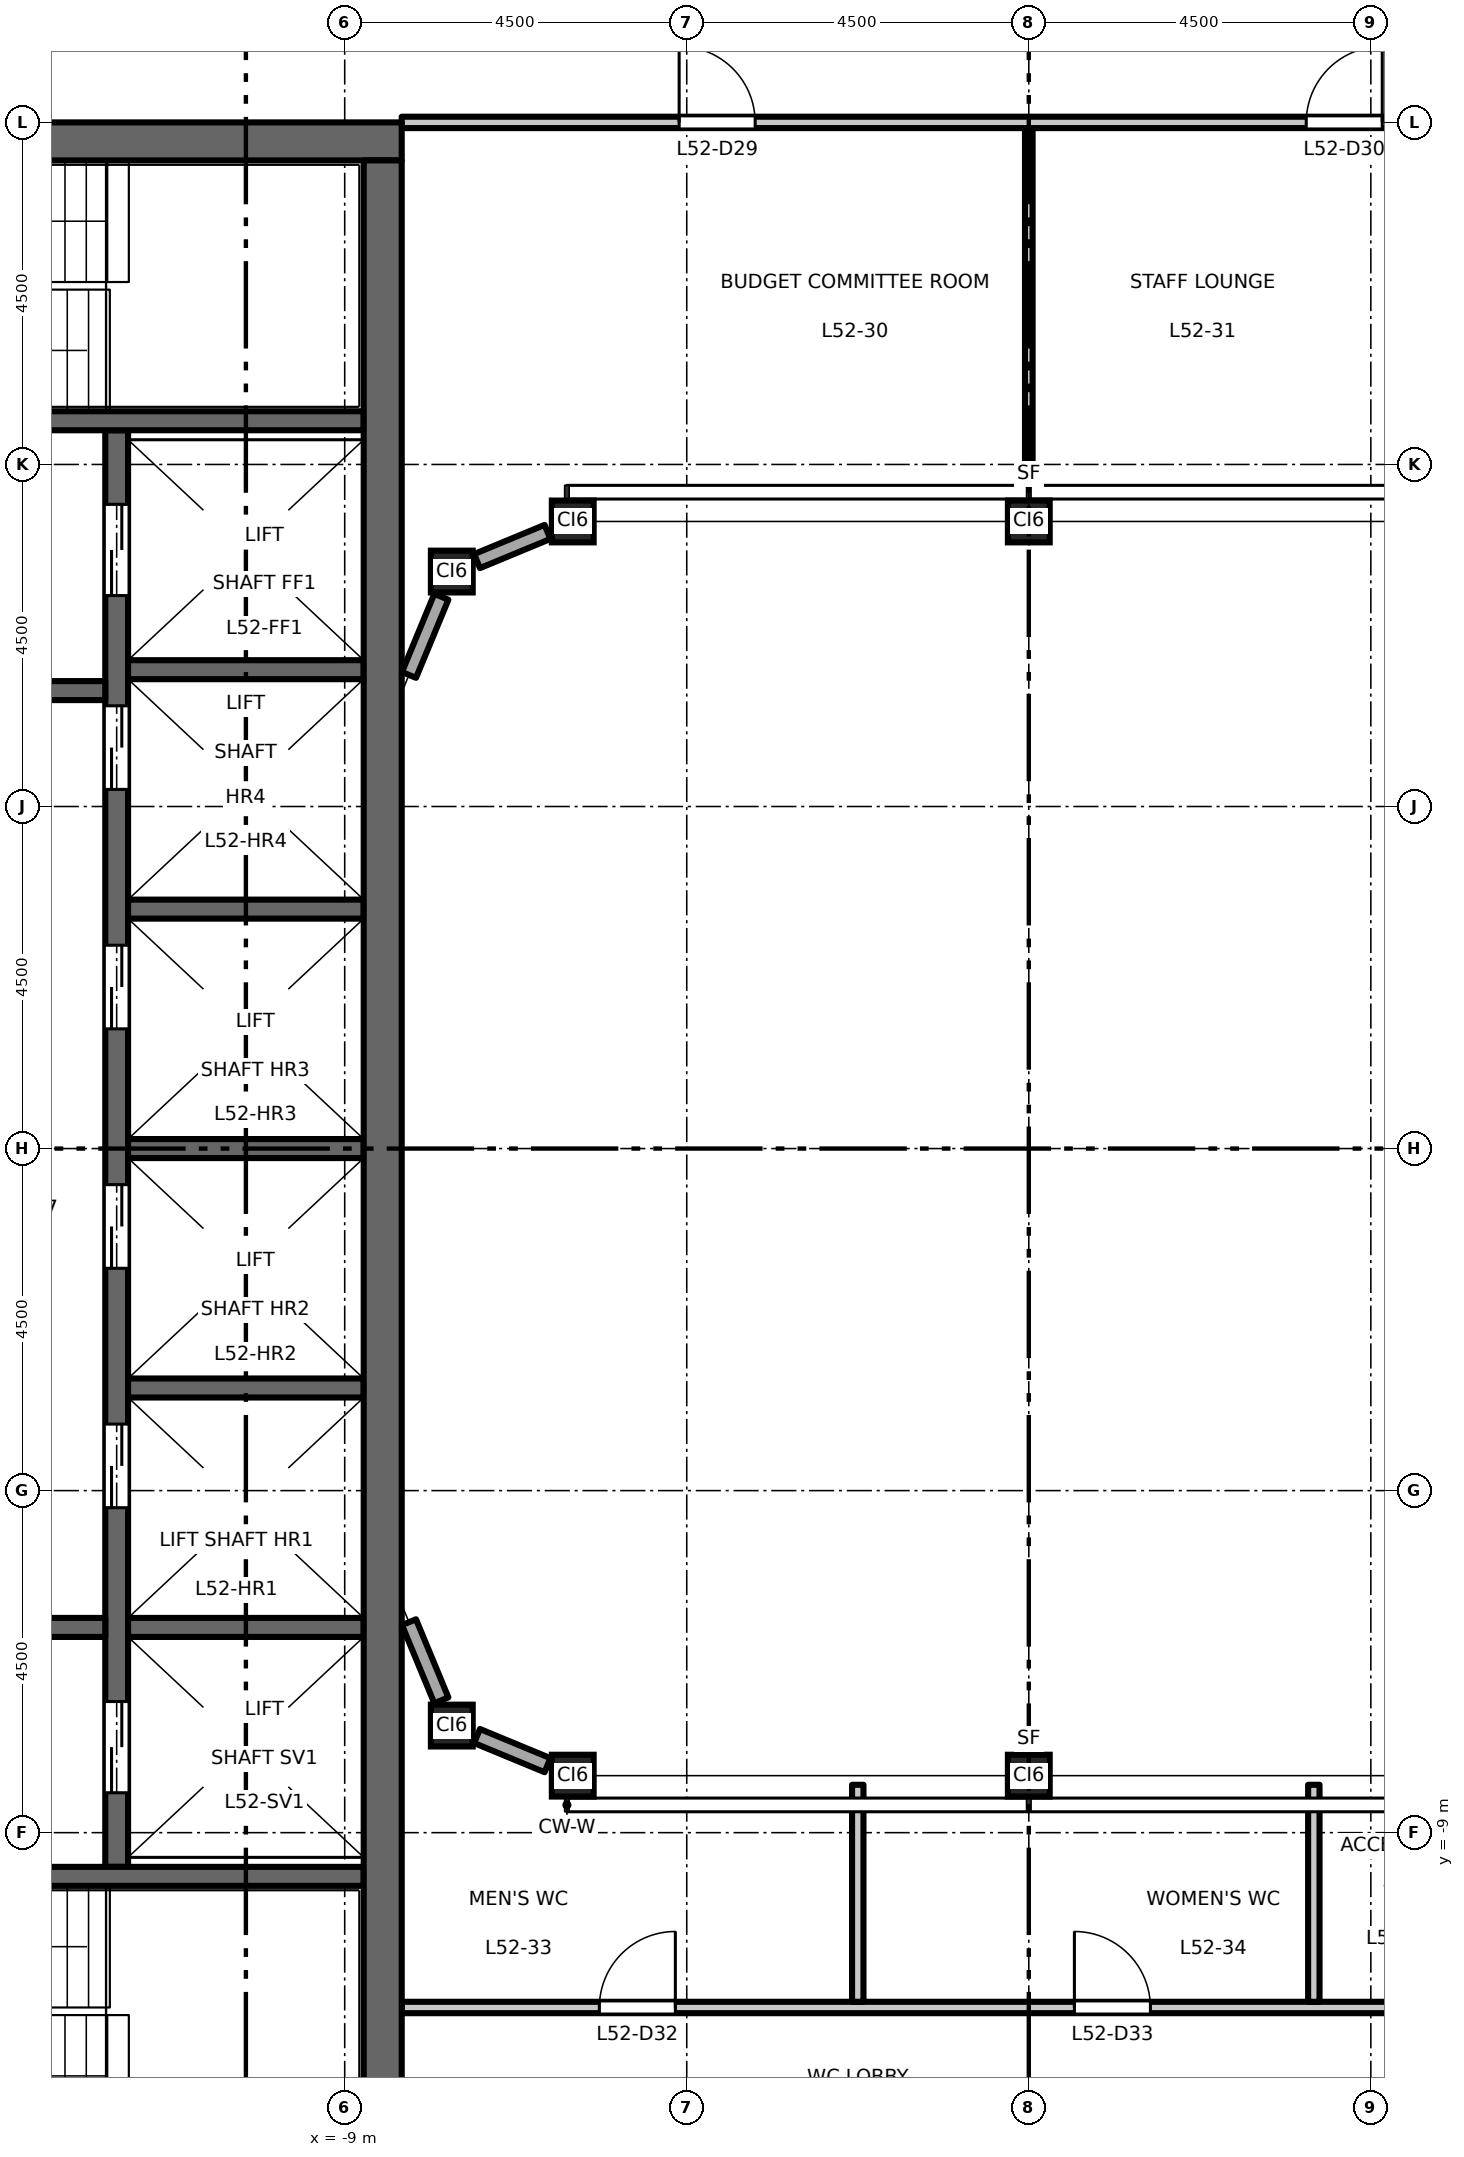
"""IFC4 building model, lengths in metres.
Left out: names, types, materials, properties, quantities, classifications, styles, units other than length and angle.
Written with IfcOpenShell. Run it as: python <this file> out.ifc"""

import sys

from ifc_helpers import new_model, si_unit, direction, frame, frame_2d, origin, origin_2d, place, context, subcontext, project, spatial, rectangle, hollow_rectangle, extrude, element, fill, save


model = new_model("IFC4")
c1 = context("Model", 3, precision=1e-05, world=origin(), true_north=direction((0.0, 1.0)))
c2 = subcontext(c1, "Body", "Model", "MODEL_VIEW")
j1 = project(units=[si_unit("LENGTHUNIT", "METRE"), si_unit("PLANEANGLEUNIT", "RADIAN")], contexts=[c1])
p1 = place(None, origin())
s1 = spatial("IfcSite", under=j1, at=p1, CompositionType="ELEMENT")
p2 = place(p1, origin())
s2 = spatial("IfcBuilding", under=s1, at=p2, CompositionType="ELEMENT")
p3 = place(p2, frame((0.0, 0.0, 242.2)))
s3 = spatial("IfcBuildingStorey", under=s2, at=p3, CompositionType="ELEMENT", Elevation=242.2)
for number, where, z_axis, x_axis in (
    (1, (-7.591, -7.591, 0.0), (0.0, 0.0, 1.0), (1.0, 0.0, 0.0)),
    (2, (-6.0, -8.25, 0.0), (0.0, 0.0, 1.0), (1.0, 0.0, 0.0)),
    (3, (0.0, -8.25, 0.0), (0.0, 0.0, 1.0), (1.0, 0.0, 0.0)),
    (4, (-7.591, 7.591, 0.0), (0.0, 0.0, 1.0), (1.0, 0.0, 0.0)),
    (5, (-6.0, 8.25, 0.0), (0.0, 0.0, 1.0), (1.0, 0.0, 0.0)),
    (6, (0.0, 8.25, 0.0), (0.0, 0.0, 1.0), (1.0, 0.0, 0.0)),
):
    element("IfcColumn", number, at=place(p3, frame(where, z_axis=z_axis, x_axis=x_axis)), inside=s3, PredefinedType="COLUMN", context=c2, shape_type="SweptSolid", body=[
        extrude(hollow_rectangle(XDim=0.55, YDim=0.55, WallThickness=0.028, at=origin_2d()), origin(), (0.0, 0.0, 1.0), 4.5),
    ])
p4 = place(p3, frame((-12.0, -9.45, 0.0), z_axis=(0.0, 0.0, 1.0), x_axis=(0.0, 1.0, 0.0)))
e7 = element("IfcWall", 7, at=p4, inside=s3, PredefinedType="SHEAR", context=c2, shape_type="SweptSolid", body=[
    extrude(rectangle(XDim=18.9, YDim=0.3, at=frame_2d((9.45, 0.0))), origin(), (0.0, 0.0, 1.0), 4.35),
])
p5 = place(p4, frame((4.725, 0.0, 0.0)))
e8 = element("IfcOpeningElement", 8, at=p5, cuts=e7, PredefinedType="OPENING", context=c2, shape_type="SweptSolid", body=[
    extrude(rectangle(XDim=1.1, YDim=2.1, at=frame_2d((0.55, 1.05))), frame((0.0, 0.16, 0.0), z_axis=(0.0, -1.0, 0.0), x_axis=(1.0, 0.0, 0.0)), (0.0, 0.0, 1.0), 0.32),
])
p6 = place(p4, frame((7.875, 0.0, 0.0)))
e9 = element("IfcOpeningElement", 9, at=p6, cuts=e7, PredefinedType="OPENING", context=c2, shape_type="SweptSolid", body=[
    extrude(rectangle(XDim=1.1, YDim=2.1, at=frame_2d((0.55, 1.05))), frame((0.0, 0.16, 0.0), z_axis=(0.0, -1.0, 0.0), x_axis=(1.0, 0.0, 0.0)), (0.0, 0.0, 1.0), 0.32),
])
p7 = place(p4, frame((11.025, 0.0, 0.0)))
e10 = element("IfcOpeningElement", 10, at=p7, cuts=e7, PredefinedType="OPENING", context=c2, shape_type="SweptSolid", body=[
    extrude(rectangle(XDim=1.1, YDim=2.1, at=frame_2d((0.55, 1.05))), frame((0.0, 0.16, 0.0), z_axis=(0.0, -1.0, 0.0), x_axis=(1.0, 0.0, 0.0)), (0.0, 0.0, 1.0), 0.32),
])
p8 = place(p4, frame((14.175, 0.0, 0.0)))
e11 = element("IfcOpeningElement", 11, at=p8, cuts=e7, PredefinedType="OPENING", context=c2, shape_type="SweptSolid", body=[
    extrude(rectangle(XDim=1.1, YDim=2.1, at=frame_2d((0.55, 1.05))), frame((0.0, 0.16, 0.0), z_axis=(0.0, -1.0, 0.0), x_axis=(1.0, 0.0, 0.0)), (0.0, 0.0, 1.0), 0.32),
])
p9 = place(p4, frame((16.725, 0.0, 0.0)))
e12 = element("IfcOpeningElement", 12, at=p9, cuts=e7, PredefinedType="OPENING", context=c2, shape_type="SweptSolid", body=[
    extrude(rectangle(XDim=1.2, YDim=2.1, at=frame_2d((0.6, 1.05))), frame((0.0, 0.16, 0.0), z_axis=(0.0, -1.0, 0.0), x_axis=(1.0, 0.0, 0.0)), (0.0, 0.0, 1.0), 0.32),
])
p10 = place(p4, frame((0.975, 0.0, 0.0)))
e13 = element("IfcOpeningElement", 13, at=p10, cuts=e7, PredefinedType="OPENING", context=c2, shape_type="SweptSolid", body=[
    extrude(rectangle(XDim=1.2, YDim=2.1, at=frame_2d((0.6, 1.05))), frame((0.0, 0.16, 0.0), z_axis=(0.0, -1.0, 0.0), x_axis=(1.0, 0.0, 0.0)), (0.0, 0.0, 1.0), 0.32),
])
p11 = place(p3, frame((-12.15, 6.025, 0.0), z_axis=(0.0, 0.0, 1.0), x_axis=(-1.0, 0.0, 0.0)))
e14 = element("IfcWall", 14, at=p11, inside=s3, PredefinedType="SHEAR", context=c2, shape_type="SweptSolid", body=[
    extrude(rectangle(XDim=4.6, YDim=0.25, at=frame_2d((2.3, 0.0))), origin(), (0.0, 0.0, 1.0), 4.35),
])
p12 = place(p11, frame((1.8, 0.0, 0.0)))
e15 = element("IfcOpeningElement", 15, at=p12, cuts=e14, PredefinedType="OPENING", context=c2, shape_type="SweptSolid", body=[
    extrude(rectangle(XDim=1.0, YDim=2.1, at=frame_2d((0.5, 1.05))), frame((0.0, 0.135, 0.0), z_axis=(0.0, -1.0, 0.0), x_axis=(1.0, 0.0, 0.0)), (0.0, 0.0, 1.0), 0.27),
])
p13 = place(p3, frame((-12.15, -6.3, 0.0), z_axis=(0.0, 0.0, 1.0), x_axis=(-1.0, 0.0, 0.0)))
e16 = element("IfcWall", 16, at=p13, inside=s3, PredefinedType="SHEAR", context=c2, shape_type="SweptSolid", body=[
    extrude(rectangle(XDim=9.1, YDim=0.25, at=frame_2d((4.55, 0.0))), origin(), (0.0, 0.0, 1.0), 4.35),
])
p14 = place(p13, frame((1.8, 0.0, 0.0)))
e17 = element("IfcOpeningElement", 17, at=p14, cuts=e16, PredefinedType="OPENING", context=c2, shape_type="SweptSolid", body=[
    extrude(rectangle(XDim=1.0, YDim=2.1, at=frame_2d((0.5, 1.05))), frame((0.0, 0.135, 0.0), z_axis=(0.0, -1.0, 0.0), x_axis=(1.0, 0.0, 0.0)), (0.0, 0.0, 1.0), 0.27),
])
for number, where, z_axis, x_axis in (
    (18, (-8.75, 0.0, 0.0), (0.0, 0.0, 1.0), (-1.0, 0.0, 0.0)),
    (19, (-8.75, 3.15, 0.0), (0.0, 0.0, 1.0), (-1.0, 0.0, 0.0)),
    (20, (-8.75, 6.3, 0.0), (0.0, 0.0, 1.0), (-1.0, 0.0, 0.0)),
    (21, (-8.75, -3.15, 0.0), (0.0, 0.0, 1.0), (-1.0, 0.0, 0.0)),
    (22, (-8.75, -6.3, 0.0), (0.0, 0.0, 1.0), (-1.0, 0.0, 0.0)),
):
    element("IfcWall", number, at=place(p3, frame(where, z_axis=z_axis, x_axis=x_axis)), inside=s3, PredefinedType="SHEAR", context=c2, shape_type="SweptSolid", body=[
        extrude(rectangle(XDim=3.1, YDim=0.25, at=frame_2d((1.55, 0.0))), origin(), (0.0, 0.0, 1.0), 4.35),
    ])
p15 = place(p3, frame((-8.75, 9.575, 0.0), z_axis=(0.0, 0.0, 1.0), x_axis=(-1.0, 0.0, 0.0)))
e23 = element("IfcWall", 23, at=p15, inside=s3, PredefinedType="SHEAR", context=c2, shape_type="SweptSolid", body=[
    extrude(rectangle(XDim=8.0, YDim=0.25, at=frame_2d((4.0, 0.0))), origin(), (0.0, 0.0, 1.0), 4.35),
])
p16 = place(p15, frame((6.65, 0.0, 0.0)))
e24 = element("IfcOpeningElement", 24, at=p16, cuts=e23, PredefinedType="OPENING", context=c2, shape_type="SweptSolid", body=[
    extrude(rectangle(XDim=1.1, YDim=2.1, at=frame_2d((0.55, 1.05))), frame((0.0, 0.135, 0.0), z_axis=(0.0, -1.0, 0.0), x_axis=(1.0, 0.0, 0.0)), (0.0, 0.0, 1.0), 0.27),
])
p17 = place(p3, frame((-8.75, -9.575, 0.0), z_axis=(0.0, 0.0, 1.0), x_axis=(-1.0, 0.0, 0.0)))
e25 = element("IfcWall", 25, at=p17, inside=s3, PredefinedType="SHEAR", context=c2, shape_type="SweptSolid", body=[
    extrude(rectangle(XDim=8.0, YDim=0.25, at=frame_2d((4.0, 0.0))), origin(), (0.0, 0.0, 1.0), 4.35),
])
p18 = place(p17, frame((6.65, 0.0, 0.0)))
e26 = element("IfcOpeningElement", 26, at=p18, cuts=e25, PredefinedType="OPENING", context=c2, shape_type="SweptSolid", body=[
    extrude(rectangle(XDim=1.1, YDim=2.1, at=frame_2d((0.55, 1.05))), frame((0.0, 0.135, 0.0), z_axis=(0.0, -1.0, 0.0), x_axis=(1.0, 0.0, 0.0)), (0.0, 0.0, 1.0), 0.27),
])
p19 = place(p3, frame((-8.25, 13.25, 0.0), z_axis=(0.0, 0.0, 1.0), x_axis=(-1.0, 0.0, 0.0)))
e27 = element("IfcWall", 27, at=p19, inside=s3, PredefinedType="SHEAR", context=c2, shape_type="SweptSolid", body=[
    extrude(rectangle(XDim=13.5, YDim=0.5, at=frame_2d((6.75, 0.0))), origin(), (0.0, 0.0, 1.0), 4.35),
])
p20 = place(p3, frame((-8.5, -13.0, 0.0), z_axis=(0.0, 0.0, 1.0), x_axis=(0.0, 1.0, 0.0)))
e28 = element("IfcWall", 28, at=p20, inside=s3, PredefinedType="SHEAR", context=c2, shape_type="SweptSolid", body=[
    extrude(rectangle(XDim=26.0, YDim=0.5, at=frame_2d((13.0, 0.0))), origin(), (0.0, 0.0, 1.0), 4.35),
])
p21 = place(p3, frame((-6.332, 8.113, 0.0), z_axis=(0.0, 0.0, 1.0), x_axis=(-0.923859650767, -0.382731427616, 0.0)))
e29 = element("IfcWall", 29, at=p21, inside=s3, PredefinedType="STANDARD", context=c2, shape_type="SweptSolid", body=[
    extrude(rectangle(XDim=1.003, YDim=0.2, at=frame_2d((0.502, 0.0))), origin(), (0.0, 0.0, 1.0), 3.918),
])
for number, where, z_axis, x_axis in (
    (30, (-7.729, 7.259, 0.0), (0.0, 0.0, 1.0), (-0.383, -0.924, 0.0)),
    (31, (-8.154, -6.231, 0.0), (0.0, 0.0, 1.0), (0.383, -0.924, 0.0)),
):
    element("IfcWall", number, at=place(p3, frame(where, z_axis=z_axis, x_axis=x_axis)), inside=s3, PredefinedType="STANDARD", context=c2, shape_type="SweptSolid", body=[
        extrude(rectangle(XDim=1.113, YDim=0.2, at=frame_2d((0.556, 0.0))), origin(), (0.0, 0.0, 1.0), 3.918),
    ])
p22 = place(p3, frame((-7.259, -7.729, 0.0), z_axis=(0.0, 0.0, 1.0), x_axis=(0.923859650767, -0.382731427616, 0.0)))
e32 = element("IfcWall", 32, at=p22, inside=s3, PredefinedType="STANDARD", context=c2, shape_type="SweptSolid", body=[
    extrude(rectangle(XDim=1.003, YDim=0.2, at=frame_2d((0.502, 0.0))), origin(), (0.0, 0.0, 1.0), 3.918),
])
p23 = place(p3, frame((-8.25, -11.3, 0.0), z_axis=(0.0, 0.0, 1.0), x_axis=(1.0, 0.0, 0.0)))
e33 = element("IfcWall", 33, at=p23, inside=s3, PredefinedType="PARTITIONING", context=c2, shape_type="SweptSolid", body=[
    extrude(rectangle(XDim=15.03, YDim=0.15, at=frame_2d((7.515, 0.0))), origin(), (0.0, 0.0, 1.0), 4.35),
])
p24 = place(p23, frame((2.6, 0.0, 0.0)))
e34 = element("IfcOpeningElement", 34, at=p24, cuts=e33, PredefinedType="OPENING", context=c2, shape_type="SweptSolid", body=[
    extrude(rectangle(XDim=1.0, YDim=2.1, at=frame_2d((0.5, 1.05))), frame((0.0, 0.085, 0.0), z_axis=(0.0, -1.0, 0.0), x_axis=(1.0, 0.0, 0.0)), (0.0, 0.0, 1.0), 0.17),
])
p25 = place(p23, frame((8.85, 0.0, 0.0)))
e35 = element("IfcOpeningElement", 35, at=p25, cuts=e33, PredefinedType="OPENING", context=c2, shape_type="SweptSolid", body=[
    extrude(rectangle(XDim=1.0, YDim=2.1, at=frame_2d((0.5, 1.05))), frame((0.0, 0.085, 0.0), z_axis=(0.0, -1.0, 0.0), x_axis=(1.0, 0.0, 0.0)), (0.0, 0.0, 1.0), 0.17),
])
p26 = place(p23, frame((13.13, 0.0, 0.0)))
e36 = element("IfcOpeningElement", 36, at=p26, cuts=e33, PredefinedType="OPENING", context=c2, shape_type="SweptSolid", body=[
    extrude(rectangle(XDim=1.0, YDim=2.1, at=frame_2d((0.5, 1.05))), frame((0.0, 0.085, 0.0), z_axis=(0.0, -1.0, 0.0), x_axis=(1.0, 0.0, 0.0)), (0.0, 0.0, 1.0), 0.17),
])
p27 = place(p3, frame((-8.25, 13.5, 0.0), z_axis=(0.0, 0.0, 1.0), x_axis=(1.0, 0.0, 0.0)))
e37 = element("IfcWall", 37, at=p27, inside=s3, PredefinedType="PARTITIONING", context=c2, shape_type="SweptSolid", body=[
    extrude(rectangle(XDim=16.5, YDim=0.15, at=frame_2d((8.25, 0.0))), origin(), (0.0, 0.0, 1.0), 4.35),
])
p28 = place(p27, frame((3.65, 0.0, 0.0)))
e38 = element("IfcOpeningElement", 38, at=p28, cuts=e37, PredefinedType="OPENING", context=c2, shape_type="SweptSolid", body=[
    extrude(rectangle(XDim=1.0, YDim=2.1, at=frame_2d((0.5, 1.05))), frame((0.0, 0.085, 0.0), z_axis=(0.0, -1.0, 0.0), x_axis=(1.0, 0.0, 0.0)), (0.0, 0.0, 1.0), 0.17),
])
p29 = place(p27, frame((11.9, 0.0, 0.0)))
e39 = element("IfcOpeningElement", 39, at=p29, cuts=e37, PredefinedType="OPENING", context=c2, shape_type="SweptSolid", body=[
    extrude(rectangle(XDim=1.0, YDim=2.1, at=frame_2d((0.5, 1.05))), frame((0.0, 0.085, 0.0), z_axis=(0.0, -1.0, 0.0), x_axis=(1.0, 0.0, 0.0)), (0.0, 0.0, 1.0), 0.17),
])
p30 = place(p3, frame((-2.25, -11.225, 0.0), z_axis=(0.0, 0.0, 1.0), x_axis=(0.0, 1.0, 0.0)))
e40 = element("IfcWall", 40, at=p30, inside=s3, PredefinedType="PARTITIONING", context=c2, shape_type="SweptSolid", body=[
    extrude(rectangle(XDim=2.855, YDim=0.15, at=frame_2d((1.427, 0.0))), origin(), (0.0, 0.0, 1.0), 4.35),
])
p31 = place(p3, frame((0.0, 8.6, 0.0), z_axis=(0.0, 0.0, 1.0), x_axis=(0.0, 1.0, 0.0)))
e41 = element("IfcWall", 41, at=p31, inside=s3, PredefinedType="PARTITIONING", context=c2, shape_type="SweptSolid", body=[
    extrude(rectangle(XDim=4.825, YDim=0.1, at=frame_2d((2.413, 0.0))), origin(), (0.0, 0.0, 1.0), 3.55),
])
p32 = place(p3, frame((3.75, -11.225, 0.0), z_axis=(0.0, 0.0, 1.0), x_axis=(0.0, 1.0, 0.0)))
e42 = element("IfcWall", 42, at=p32, inside=s3, PredefinedType="PARTITIONING", context=c2, shape_type="SweptSolid", body=[
    extrude(rectangle(XDim=2.855, YDim=0.15, at=frame_2d((1.427, 0.0))), origin(), (0.0, 0.0, 1.0), 4.35),
])
p33 = place(p5, origin())
e43 = element("IfcDoor", 43, at=p33, inside=s3, OperationType="DOUBLE_DOOR_SLIDING", PredefinedType="DOOR", context=c2, shape_type="SweptSolid", body=[
    extrude(rectangle(XDim=1.1, YDim=2.1, at=frame_2d((0.55, 1.05))), frame((0.0, 0.025, 0.0), z_axis=(0.0, -1.0, 0.0), x_axis=(1.0, 0.0, 0.0)), (0.0, 0.0, 1.0), 0.05),
])
fill(e8, e43)
p34 = place(p6, origin())
e44 = element("IfcDoor", 44, at=p34, inside=s3, OperationType="DOUBLE_DOOR_SLIDING", PredefinedType="DOOR", context=c2, shape_type="SweptSolid", body=[
    extrude(rectangle(XDim=1.1, YDim=2.1, at=frame_2d((0.55, 1.05))), frame((0.0, 0.025, 0.0), z_axis=(0.0, -1.0, 0.0), x_axis=(1.0, 0.0, 0.0)), (0.0, 0.0, 1.0), 0.05),
])
fill(e9, e44)
p35 = place(p7, origin())
e45 = element("IfcDoor", 45, at=p35, inside=s3, OperationType="DOUBLE_DOOR_SLIDING", PredefinedType="DOOR", context=c2, shape_type="SweptSolid", body=[
    extrude(rectangle(XDim=1.1, YDim=2.1, at=frame_2d((0.55, 1.05))), frame((0.0, 0.025, 0.0), z_axis=(0.0, -1.0, 0.0), x_axis=(1.0, 0.0, 0.0)), (0.0, 0.0, 1.0), 0.05),
])
fill(e10, e45)
p36 = place(p8, origin())
e46 = element("IfcDoor", 46, at=p36, inside=s3, OperationType="DOUBLE_DOOR_SLIDING", PredefinedType="DOOR", context=c2, shape_type="SweptSolid", body=[
    extrude(rectangle(XDim=1.1, YDim=2.1, at=frame_2d((0.55, 1.05))), frame((0.0, 0.025, 0.0), z_axis=(0.0, -1.0, 0.0), x_axis=(1.0, 0.0, 0.0)), (0.0, 0.0, 1.0), 0.05),
])
fill(e11, e46)
p37 = place(p9, origin())
e47 = element("IfcDoor", 47, at=p37, inside=s3, OperationType="DOUBLE_DOOR_SLIDING", PredefinedType="DOOR", context=c2, shape_type="SweptSolid", body=[
    extrude(rectangle(XDim=1.2, YDim=2.1, at=frame_2d((0.6, 1.05))), frame((0.0, 0.025, 0.0), z_axis=(0.0, -1.0, 0.0), x_axis=(1.0, 0.0, 0.0)), (0.0, 0.0, 1.0), 0.05),
])
fill(e12, e47)
p38 = place(p10, origin())
e48 = element("IfcDoor", 48, at=p38, inside=s3, OperationType="DOUBLE_DOOR_SLIDING", PredefinedType="DOOR", context=c2, shape_type="SweptSolid", body=[
    extrude(rectangle(XDim=1.2, YDim=2.1, at=frame_2d((0.6, 1.05))), frame((0.0, 0.025, 0.0), z_axis=(0.0, -1.0, 0.0), x_axis=(1.0, 0.0, 0.0)), (0.0, 0.0, 1.0), 0.05),
])
fill(e13, e48)
p39 = place(p28, origin())
e49 = element("IfcDoor", 49, at=p39, inside=s3, OperationType="SINGLE_SWING_LEFT", PredefinedType="DOOR", context=c2, shape_type="SweptSolid", body=[
    extrude(rectangle(XDim=1.0, YDim=2.1, at=frame_2d((0.5, 1.05))), frame((0.0, 0.025, 0.0), z_axis=(0.0, -1.0, 0.0), x_axis=(1.0, 0.0, 0.0)), (0.0, 0.0, 1.0), 0.05),
])
fill(e38, e49)
p40 = place(p29, origin())
e50 = element("IfcDoor", 50, at=p40, inside=s3, OperationType="SINGLE_SWING_RIGHT", PredefinedType="DOOR", context=c2, shape_type="SweptSolid", body=[
    extrude(rectangle(XDim=1.0, YDim=2.1, at=frame_2d((0.5, 1.05))), frame((0.0, 0.025, 0.0), z_axis=(0.0, -1.0, 0.0), x_axis=(1.0, 0.0, 0.0)), (0.0, 0.0, 1.0), 0.05),
])
fill(e39, e50)
p41 = place(p24, origin())
e51 = element("IfcDoor", 51, at=p41, inside=s3, OperationType="SINGLE_SWING_RIGHT", PredefinedType="DOOR", context=c2, shape_type="SweptSolid", body=[
    extrude(rectangle(XDim=1.0, YDim=2.1, at=frame_2d((0.5, 1.05))), frame((0.0, 0.025, 0.0), z_axis=(0.0, -1.0, 0.0), x_axis=(1.0, 0.0, 0.0)), (0.0, 0.0, 1.0), 0.05),
])
fill(e34, e51)
p42 = place(p25, origin())
e52 = element("IfcDoor", 52, at=p42, inside=s3, OperationType="SINGLE_SWING_LEFT", PredefinedType="DOOR", context=c2, shape_type="SweptSolid", body=[
    extrude(rectangle(XDim=1.0, YDim=2.1, at=frame_2d((0.5, 1.05))), frame((0.0, 0.025, 0.0), z_axis=(0.0, -1.0, 0.0), x_axis=(1.0, 0.0, 0.0)), (0.0, 0.0, 1.0), 0.05),
])
fill(e35, e52)
save(model, sys.argv[1])
